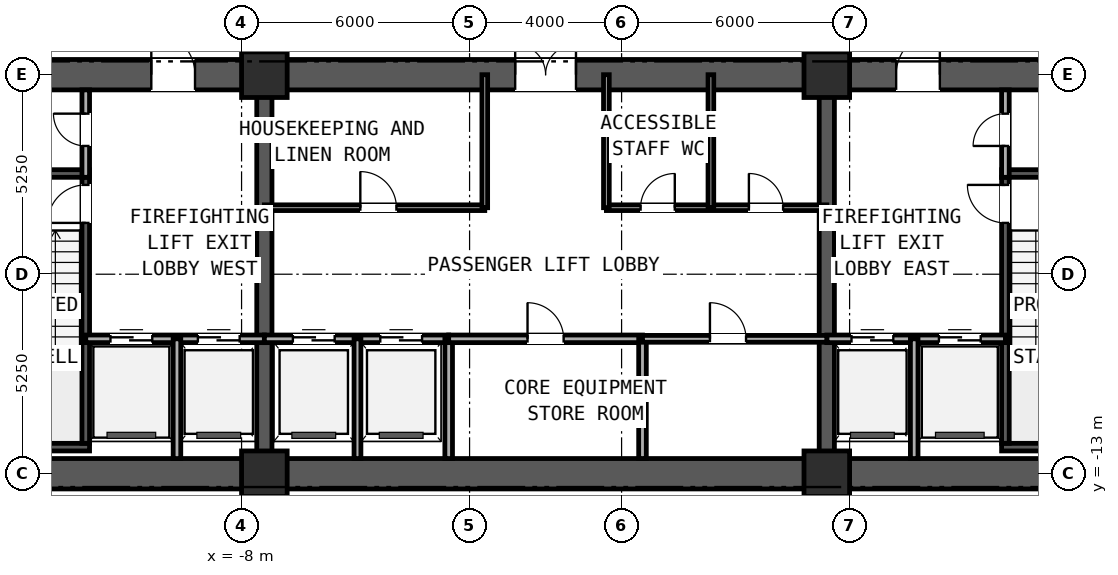
"""IFC4 building model, lengths in metres.
Left out: names, types, materials, properties, quantities, classifications, styles, units other than length and angle.
Written with IfcOpenShell. Run it as: python <this file> out.ifc"""

import sys

from ifc_helpers import new_model, si_unit, direction, frame, frame_2d, origin, origin_2d, place, context, subcontext, project, spatial, rectangle, extrude, element, fill, save


model = new_model("IFC4")
c1 = context("Model", 3, precision=1e-05, world=origin(), true_north=direction((0.0, 1.0)))
c2 = subcontext(c1, "Body", "Model", "MODEL_VIEW")
j1 = project(units=[si_unit("LENGTHUNIT", "METRE"), si_unit("PLANEANGLEUNIT", "RADIAN")], contexts=[c1])
p1 = place(None, origin())
s1 = spatial("IfcSite", under=j1, at=p1, CompositionType="ELEMENT")
p2 = place(p1, origin())
s2 = spatial("IfcBuilding", under=s1, at=p2, CompositionType="ELEMENT")
p3 = place(p2, frame((0.0, 0.0, -10.0)))
s3 = spatial("IfcBuildingStorey", under=s2, at=p3, CompositionType="ELEMENT", Elevation=-10.0)
p4 = place(p3, frame((-16.4, -13.0, 0.0), z_axis=(0.0, 0.0, 1.0), x_axis=(1.0, 0.0, 0.0)))
e1 = element("IfcWall", 1, at=p4, inside=s3, PredefinedType="SHEAR", context=c2, shape_type="SweptSolid", body=[
    extrude(rectangle(XDim=32.8, YDim=0.8, at=frame_2d((16.4, 0.0))), origin(), (0.0, 0.0, 1.0), 4.2),
])
p5 = place(p3, frame((-16.4, -2.5, 0.0), z_axis=(0.0, 0.0, 1.0), x_axis=(1.0, 0.0, 0.0)))
e2 = element("IfcWall", 2, at=p5, inside=s3, PredefinedType="SHEAR", context=c2, shape_type="SweptSolid", body=[
    extrude(rectangle(XDim=32.8, YDim=0.8, at=frame_2d((16.4, 0.0))), origin(), (0.0, 0.0, 1.0), 4.2),
])
p6 = place(p5, frame((6.025, 0.0, 0.0)))
e3 = element("IfcOpeningElement", 3, at=p6, cuts=e2, PredefinedType="OPENING", context=c2, shape_type="SweptSolid", body=[
    extrude(rectangle(XDim=1.15, YDim=2.0, at=frame_2d((0.575, 1.0))), frame((0.0, 0.41, 0.0), z_axis=(0.0, -1.0, 0.0), x_axis=(1.0, 0.0, 0.0)), (0.0, 0.0, 1.0), 0.82),
])
p7 = place(p5, frame((15.6, 0.0, 0.0)))
e4 = element("IfcOpeningElement", 4, at=p7, cuts=e2, PredefinedType="OPENING", context=c2, shape_type="SweptSolid", body=[
    extrude(rectangle(XDim=1.6, YDim=2.0, at=frame_2d((0.8, 1.0))), frame((0.0, 0.41, 0.0), z_axis=(0.0, -1.0, 0.0), x_axis=(1.0, 0.0, 0.0)), (0.0, 0.0, 1.0), 0.82),
])
p8 = place(p5, frame((25.625, 0.0, 0.0)))
e5 = element("IfcOpeningElement", 5, at=p8, cuts=e2, PredefinedType="OPENING", context=c2, shape_type="SweptSolid", body=[
    extrude(rectangle(XDim=1.15, YDim=2.0, at=frame_2d((0.575, 1.0))), frame((0.0, 0.41, 0.0), z_axis=(0.0, -1.0, 0.0), x_axis=(1.0, 0.0, 0.0)), (0.0, 0.0, 1.0), 0.82),
])
for number, where, z_axis, x_axis in (
    (6, (-7.4, -12.6, 0.0), (0.0, 0.0, 1.0), (0.0, 1.0, 0.0)),
    (7, (7.4, -12.6, 0.0), (0.0, 0.0, 1.0), (0.0, 1.0, 0.0)),
):
    element("IfcWall", number, at=place(p3, frame(where, z_axis=z_axis, x_axis=x_axis)), inside=s3, PredefinedType="SHEAR", context=c2, shape_type="SweptSolid", body=[
        extrude(rectangle(XDim=9.7, YDim=0.4, at=frame_2d((4.85, 0.0))), origin(), (0.0, 0.0, 1.0), 4.48),
    ])
for number, where, z_axis, x_axis in (
    (8, (-15.6, -12.3, 0.0), (0.0, 0.0, 1.0), (1.0, 0.0, 0.0)),
    (9, (-15.6, -5.1, 0.0), (0.0, 0.0, 1.0), (1.0, 0.0, 0.0)),
):
    element("IfcWall", number, at=place(p3, frame(where, z_axis=z_axis, x_axis=x_axis)), inside=s3, PredefinedType="SOLIDWALL", context=c2, shape_type="SweptSolid", body=[
        extrude(rectangle(XDim=3.6, YDim=0.2, at=frame_2d((1.8, 0.0))), origin(), (0.0, 0.0, 1.0), 4.48),
    ])
p9 = place(p3, frame((-12.1, -12.2, 0.0), z_axis=(0.0, 0.0, 1.0), x_axis=(0.0, 1.0, 0.0)))
e10 = element("IfcWall", 10, at=p9, inside=s3, PredefinedType="SOLIDWALL", context=c2, shape_type="SweptSolid", body=[
    extrude(rectangle(XDim=7.0, YDim=0.2, at=frame_2d((3.5, 0.0))), origin(), (0.0, 0.0, 1.0), 4.48),
])
p10 = place(p9, frame((5.8, 0.0, 0.0)))
e11 = element("IfcOpeningElement", 11, at=p10, cuts=e10, PredefinedType="OPENING", context=c2, shape_type="SweptSolid", body=[
    extrude(rectangle(XDim=1.0, YDim=2.1, at=frame_2d((0.5, 1.05))), frame((0.0, 0.11, 0.0), z_axis=(0.0, -1.0, 0.0), x_axis=(1.0, 0.0, 0.0)), (0.0, 0.0, 1.0), 0.22),
])
for number, where, z_axis, x_axis in (
    (12, (12.0, -12.3, 0.0), (0.0, 0.0, 1.0), (1.0, 0.0, 0.0)),
    (13, (12.0, -5.1, 0.0), (0.0, 0.0, 1.0), (1.0, 0.0, 0.0)),
):
    element("IfcWall", number, at=place(p3, frame(where, z_axis=z_axis, x_axis=x_axis)), inside=s3, PredefinedType="SOLIDWALL", context=c2, shape_type="SweptSolid", body=[
        extrude(rectangle(XDim=3.6, YDim=0.2, at=frame_2d((1.8, 0.0))), origin(), (0.0, 0.0, 1.0), 4.48),
    ])
p11 = place(p3, frame((12.1, -12.2, 0.0), z_axis=(0.0, 0.0, 1.0), x_axis=(0.0, 1.0, 0.0)))
e14 = element("IfcWall", 14, at=p11, inside=s3, PredefinedType="SOLIDWALL", context=c2, shape_type="SweptSolid", body=[
    extrude(rectangle(XDim=7.0, YDim=0.2, at=frame_2d((3.5, 0.0))), origin(), (0.0, 0.0, 1.0), 4.48),
])
p12 = place(p11, frame((5.8, 0.0, 0.0)))
e15 = element("IfcOpeningElement", 15, at=p12, cuts=e14, PredefinedType="OPENING", context=c2, shape_type="SweptSolid", body=[
    extrude(rectangle(XDim=1.0, YDim=2.1, at=frame_2d((0.5, 1.05))), frame((0.0, 0.11, 0.0), z_axis=(0.0, -1.0, 0.0), x_axis=(1.0, 0.0, 0.0)), (0.0, 0.0, 1.0), 0.22),
])
for number, where, z_axis, x_axis in (
    (16, (-7.4, -13.0, 0.0), (0.0, 0.0, 1.0), (1.0, 0.0, 0.0)),
    (17, (7.4, -13.0, 0.0), (0.0, 0.0, 1.0), (1.0, 0.0, 0.0)),
    (18, (-7.4, -2.5, 0.0), (0.0, 0.0, 1.0), (1.0, 0.0, 0.0)),
    (19, (7.4, -2.5, 0.0), (0.0, 0.0, 1.0), (1.0, 0.0, 0.0)),
):
    element("IfcColumn", number, at=place(p3, frame(where, z_axis=z_axis, x_axis=x_axis)), inside=s3, PredefinedType="COLUMN", context=c2, shape_type="SweptSolid", body=[
        extrude(rectangle(XDim=1.2, YDim=1.2, at=origin_2d()), origin(), (0.0, 0.0, 1.0), 4.8),
    ])
p13 = place(p3, frame((-12.1, -5.2, 0.0), z_axis=(0.0, 0.0, 1.0), x_axis=(0.0, 1.0, 0.0)))
e20 = element("IfcWall", 20, at=p13, inside=s3, PredefinedType="PARTITIONING", context=c2, shape_type="SweptSolid", body=[
    extrude(rectangle(XDim=2.3, YDim=0.2, at=frame_2d((1.15, 0.0))), origin(), (0.0, 0.0, 1.0), 4.48),
])
p14 = place(p13, frame((0.825, 0.0, 0.0)))
e21 = element("IfcOpeningElement", 21, at=p14, cuts=e20, PredefinedType="OPENING", context=c2, shape_type="SweptSolid", body=[
    extrude(rectangle(XDim=0.85, YDim=2.05, at=frame_2d((0.425, 1.025))), frame((0.0, 0.11, 0.0), z_axis=(0.0, -1.0, 0.0), x_axis=(1.0, 0.0, 0.0)), (0.0, 0.0, 1.0), 0.22),
])
p15 = place(p3, frame((12.1, -5.2, 0.0), z_axis=(0.0, 0.0, 1.0), x_axis=(0.0, 1.0, 0.0)))
e22 = element("IfcWall", 22, at=p15, inside=s3, PredefinedType="PARTITIONING", context=c2, shape_type="SweptSolid", body=[
    extrude(rectangle(XDim=2.3, YDim=0.2, at=frame_2d((1.15, 0.0))), origin(), (0.0, 0.0, 1.0), 4.48),
])
p16 = place(p15, frame((0.825, 0.0, 0.0)))
e23 = element("IfcOpeningElement", 23, at=p16, cuts=e22, PredefinedType="OPENING", context=c2, shape_type="SweptSolid", body=[
    extrude(rectangle(XDim=0.85, YDim=2.05, at=frame_2d((0.425, 1.025))), frame((0.0, 0.11, 0.0), z_axis=(0.0, -1.0, 0.0), x_axis=(1.0, 0.0, 0.0)), (0.0, 0.0, 1.0), 0.22),
])
p17 = place(p3, frame((-12.1, -9.45, 0.0), z_axis=(0.0, 0.0, 1.0), x_axis=(1.0, 0.0, 0.0)))
e24 = element("IfcWall", 24, at=p17, inside=s3, PredefinedType="PARTITIONING", context=c2, shape_type="SweptSolid", body=[
    extrude(rectangle(XDim=4.7, YDim=0.2, at=frame_2d((2.35, 0.0))), origin(), (0.0, 0.0, 1.0), 4.48),
])
p18 = place(p17, frame((0.65, 0.0, 0.0)))
e25 = element("IfcOpeningElement", 25, at=p18, cuts=e24, PredefinedType="OPENING", context=c2, shape_type="SweptSolid", body=[
    extrude(rectangle(XDim=1.1, YDim=2.2, at=frame_2d((0.55, 1.1))), frame((0.0, 0.11, 0.0), z_axis=(0.0, -1.0, 0.0), x_axis=(1.0, 0.0, 0.0)), (0.0, 0.0, 1.0), 0.22),
])
p19 = place(p17, frame((2.95, 0.0, 0.0)))
e26 = element("IfcOpeningElement", 26, at=p19, cuts=e24, PredefinedType="OPENING", context=c2, shape_type="SweptSolid", body=[
    extrude(rectangle(XDim=1.1, YDim=2.2, at=frame_2d((0.55, 1.1))), frame((0.0, 0.11, 0.0), z_axis=(0.0, -1.0, 0.0), x_axis=(1.0, 0.0, 0.0)), (0.0, 0.0, 1.0), 0.22),
])
p20 = place(p3, frame((-9.7, -12.6, 0.0), z_axis=(0.0, 0.0, 1.0), x_axis=(0.0, 1.0, 0.0)))
e27 = element("IfcWall", 27, at=p20, inside=s3, PredefinedType="PARTITIONING", context=c2, shape_type="SweptSolid", body=[
    extrude(rectangle(XDim=3.15, YDim=0.2, at=frame_2d((1.575, 0.0))), origin(), (0.0, 0.0, 1.0), 4.48),
])
p21 = place(p3, frame((7.4, -9.45, 0.0), z_axis=(0.0, 0.0, 1.0), x_axis=(1.0, 0.0, 0.0)))
e28 = element("IfcWall", 28, at=p21, inside=s3, PredefinedType="PARTITIONING", context=c2, shape_type="SweptSolid", body=[
    extrude(rectangle(XDim=4.7, YDim=0.2, at=frame_2d((2.35, 0.0))), origin(), (0.0, 0.0, 1.0), 4.48),
])
p22 = place(p21, frame((2.95, 0.0, 0.0)))
e29 = element("IfcOpeningElement", 29, at=p22, cuts=e28, PredefinedType="OPENING", context=c2, shape_type="SweptSolid", body=[
    extrude(rectangle(XDim=1.1, YDim=2.2, at=frame_2d((0.55, 1.1))), frame((0.0, 0.11, 0.0), z_axis=(0.0, -1.0, 0.0), x_axis=(1.0, 0.0, 0.0)), (0.0, 0.0, 1.0), 0.22),
])
p23 = place(p21, frame((0.65, 0.0, 0.0)))
e30 = element("IfcOpeningElement", 30, at=p23, cuts=e28, PredefinedType="OPENING", context=c2, shape_type="SweptSolid", body=[
    extrude(rectangle(XDim=1.1, YDim=2.2, at=frame_2d((0.55, 1.1))), frame((0.0, 0.11, 0.0), z_axis=(0.0, -1.0, 0.0), x_axis=(1.0, 0.0, 0.0)), (0.0, 0.0, 1.0), 0.22),
])
p24 = place(p3, frame((9.7, -12.6, 0.0), z_axis=(0.0, 0.0, 1.0), x_axis=(0.0, 1.0, 0.0)))
e31 = element("IfcWall", 31, at=p24, inside=s3, PredefinedType="PARTITIONING", context=c2, shape_type="SweptSolid", body=[
    extrude(rectangle(XDim=3.15, YDim=0.2, at=frame_2d((1.575, 0.0))), origin(), (0.0, 0.0, 1.0), 4.48),
])
p25 = place(p3, frame((-7.4, -9.45, 0.0), z_axis=(0.0, 0.0, 1.0), x_axis=(1.0, 0.0, 0.0)))
e32 = element("IfcWall", 32, at=p25, inside=s3, PredefinedType="PARTITIONING", context=c2, shape_type="SweptSolid", body=[
    extrude(rectangle(XDim=4.85, YDim=0.2, at=frame_2d((2.425, 0.0))), origin(), (0.0, 0.0, 1.0), 4.48),
])
p26 = place(p25, frame((0.75, 0.0, 0.0)))
e33 = element("IfcOpeningElement", 33, at=p26, cuts=e32, PredefinedType="OPENING", context=c2, shape_type="SweptSolid", body=[
    extrude(rectangle(XDim=1.1, YDim=2.2, at=frame_2d((0.55, 1.1))), frame((0.0, 0.11, 0.0), z_axis=(0.0, -1.0, 0.0), x_axis=(1.0, 0.0, 0.0)), (0.0, 0.0, 1.0), 0.22),
])
p27 = place(p25, frame((3.05, 0.0, 0.0)))
e34 = element("IfcOpeningElement", 34, at=p27, cuts=e32, PredefinedType="OPENING", context=c2, shape_type="SweptSolid", body=[
    extrude(rectangle(XDim=1.1, YDim=2.2, at=frame_2d((0.55, 1.1))), frame((0.0, 0.11, 0.0), z_axis=(0.0, -1.0, 0.0), x_axis=(1.0, 0.0, 0.0)), (0.0, 0.0, 1.0), 0.22),
])
p28 = place(p3, frame((-4.95, -12.6, 0.0), z_axis=(0.0, 0.0, 1.0), x_axis=(0.0, 1.0, 0.0)))
e35 = element("IfcWall", 35, at=p28, inside=s3, PredefinedType="PARTITIONING", context=c2, shape_type="SweptSolid", body=[
    extrude(rectangle(XDim=3.15, YDim=0.18, at=frame_2d((1.575, 0.0))), origin(), (0.0, 0.0, 1.0), 4.48),
])
p29 = place(p3, frame((-2.55, -12.6, 0.0), z_axis=(0.0, 0.0, 1.0), x_axis=(0.0, 1.0, 0.0)))
e36 = element("IfcWall", 36, at=p29, inside=s3, PredefinedType="PARTITIONING", context=c2, shape_type="SweptSolid", body=[
    extrude(rectangle(XDim=3.15, YDim=0.2, at=frame_2d((1.575, 0.0))), origin(), (0.0, 0.0, 1.0), 4.48),
])
p30 = place(p3, frame((-2.55, -9.45, 0.0), z_axis=(0.0, 0.0, 1.0), x_axis=(1.0, 0.0, 0.0)))
e37 = element("IfcWall", 37, at=p30, inside=s3, PredefinedType="PARTITIONING", context=c2, shape_type="SweptSolid", body=[
    extrude(rectangle(XDim=5.1, YDim=0.2, at=frame_2d((2.55, 0.0))), origin(), (0.0, 0.0, 1.0), 4.48),
])
p31 = place(p30, frame((2.075, 0.0, 0.0)))
e38 = element("IfcOpeningElement", 38, at=p31, cuts=e37, PredefinedType="OPENING", context=c2, shape_type="SweptSolid", body=[
    extrude(rectangle(XDim=0.95, YDim=2.15, at=frame_2d((0.475, 1.075))), frame((0.0, 0.11, 0.0), z_axis=(0.0, -1.0, 0.0), x_axis=(1.0, 0.0, 0.0)), (0.0, 0.0, 1.0), 0.22),
])
p32 = place(p3, frame((2.55, -12.6, 0.0), z_axis=(0.0, 0.0, 1.0), x_axis=(0.0, 1.0, 0.0)))
e39 = element("IfcWall", 39, at=p32, inside=s3, PredefinedType="PARTITIONING", context=c2, shape_type="SweptSolid", body=[
    extrude(rectangle(XDim=3.15, YDim=0.2, at=frame_2d((1.575, 0.0))), origin(), (0.0, 0.0, 1.0), 4.48),
])
p33 = place(p3, frame((2.55, -9.45, 0.0), z_axis=(0.0, 0.0, 1.0), x_axis=(1.0, 0.0, 0.0)))
e40 = element("IfcWall", 40, at=p33, inside=s3, PredefinedType="PARTITIONING", context=c2, shape_type="SweptSolid", body=[
    extrude(rectangle(XDim=4.85, YDim=0.18, at=frame_2d((2.425, 0.0))), origin(), (0.0, 0.0, 1.0), 4.48),
])
p34 = place(p33, frame((1.775, 0.0, 0.0)))
e41 = element("IfcOpeningElement", 41, at=p34, cuts=e40, PredefinedType="OPENING", context=c2, shape_type="SweptSolid", body=[
    extrude(rectangle(XDim=0.95, YDim=2.15, at=frame_2d((0.475, 1.075))), frame((0.0, 0.1, 0.0), z_axis=(0.0, -1.0, 0.0), x_axis=(1.0, 0.0, 0.0)), (0.0, 0.0, 1.0), 0.2),
])
p35 = place(p3, frame((-7.4, -6.0, 0.0), z_axis=(0.0, 0.0, 1.0), x_axis=(1.0, 0.0, 0.0)))
e42 = element("IfcWall", 42, at=p35, inside=s3, PredefinedType="PARTITIONING", context=c2, shape_type="SweptSolid", body=[
    extrude(rectangle(XDim=5.8, YDim=0.15, at=frame_2d((2.9, 0.0))), origin(), (0.0, 0.0, 1.0), 4.48),
])
p36 = place(p35, frame((2.525, 0.0, 0.0)))
e43 = element("IfcOpeningElement", 43, at=p36, cuts=e42, PredefinedType="OPENING", context=c2, shape_type="SweptSolid", body=[
    extrude(rectangle(XDim=0.95, YDim=2.15, at=frame_2d((0.475, 1.075))), frame((0.0, 0.085, 0.0), z_axis=(0.0, -1.0, 0.0), x_axis=(1.0, 0.0, 0.0)), (0.0, 0.0, 1.0), 0.17),
])
p37 = place(p3, frame((-1.6, -6.0, 0.0), z_axis=(0.0, 0.0, 1.0), x_axis=(0.0, 1.0, 0.0)))
e44 = element("IfcWall", 44, at=p37, inside=s3, PredefinedType="PARTITIONING", context=c2, shape_type="SweptSolid", body=[
    extrude(rectangle(XDim=3.5, YDim=0.15, at=frame_2d((1.75, 0.0))), origin(), (0.0, 0.0, 1.0), 3.61),
])
p38 = place(p3, frame((1.6, -6.0, 0.0), z_axis=(0.0, 0.0, 1.0), x_axis=(1.0, 0.0, 0.0)))
e45 = element("IfcWall", 45, at=p38, inside=s3, PredefinedType="PARTITIONING", context=c2, shape_type="SweptSolid", body=[
    extrude(rectangle(XDim=5.8, YDim=0.15, at=frame_2d((2.9, 0.0))), origin(), (0.0, 0.0, 1.0), 4.48),
])
p39 = place(p38, frame((0.9, 0.0, 0.0)))
e46 = element("IfcOpeningElement", 46, at=p39, cuts=e45, PredefinedType="OPENING", context=c2, shape_type="SweptSolid", body=[
    extrude(rectangle(XDim=0.9, YDim=2.1, at=frame_2d((0.45, 1.05))), frame((0.0, 0.085, 0.0), z_axis=(0.0, -1.0, 0.0), x_axis=(1.0, 0.0, 0.0)), (0.0, 0.0, 1.0), 0.17),
])
p40 = place(p38, frame((3.75, 0.0, 0.0)))
e47 = element("IfcOpeningElement", 47, at=p40, cuts=e45, PredefinedType="OPENING", context=c2, shape_type="SweptSolid", body=[
    extrude(rectangle(XDim=0.9, YDim=2.1, at=frame_2d((0.45, 1.05))), frame((0.0, 0.085, 0.0), z_axis=(0.0, -1.0, 0.0), x_axis=(1.0, 0.0, 0.0)), (0.0, 0.0, 1.0), 0.17),
])
for number, where, z_axis, x_axis in (
    (48, (1.6, -6.0, 0.0), (0.0, 0.0, 1.0), (0.0, 1.0, 0.0)),
    (49, (4.35, -6.0, 0.0), (0.0, 0.0, 1.0), (0.0, 1.0, 0.0)),
):
    element("IfcWall", number, at=place(p3, frame(where, z_axis=z_axis, x_axis=x_axis)), inside=s3, PredefinedType="PARTITIONING", context=c2, shape_type="SweptSolid", body=[
        extrude(rectangle(XDim=3.5, YDim=0.15, at=frame_2d((1.75, 0.0))), origin(), (0.0, 0.0, 1.0), 3.61),
    ])
p41 = place(p10, frame((1.0, 0.0, 0.0), z_axis=(0.0, 0.0, 1.0), x_axis=(-1.0, 0.0, 0.0)))
e50 = element("IfcDoor", 50, at=p41, inside=s3, OperationType="SINGLE_SWING_LEFT", PredefinedType="DOOR", context=c2, shape_type="SweptSolid", body=[
    extrude(rectangle(XDim=1.0, YDim=2.1, at=frame_2d((0.5, 1.05))), frame((0.0, 0.025, 0.0), z_axis=(0.0, -1.0, 0.0), x_axis=(1.0, 0.0, 0.0)), (0.0, 0.0, 1.0), 0.05),
])
fill(e11, e50)
p42 = place(p14, origin())
e51 = element("IfcDoor", 51, at=p42, inside=s3, OperationType="SINGLE_SWING_RIGHT", PredefinedType="DOOR", context=c2, shape_type="SweptSolid", body=[
    extrude(rectangle(XDim=0.85, YDim=2.05, at=frame_2d((0.425, 1.025))), frame((0.0, 0.025, 0.0), z_axis=(0.0, -1.0, 0.0), x_axis=(1.0, 0.0, 0.0)), (0.0, 0.0, 1.0), 0.05),
])
fill(e21, e51)
p43 = place(p12, origin())
e52 = element("IfcDoor", 52, at=p43, inside=s3, OperationType="SINGLE_SWING_RIGHT", PredefinedType="DOOR", context=c2, shape_type="SweptSolid", body=[
    extrude(rectangle(XDim=1.0, YDim=2.1, at=frame_2d((0.5, 1.05))), frame((0.0, 0.025, 0.0), z_axis=(0.0, -1.0, 0.0), x_axis=(1.0, 0.0, 0.0)), (0.0, 0.0, 1.0), 0.05),
])
fill(e15, e52)
p44 = place(p16, frame((0.85, 0.0, 0.0), z_axis=(0.0, 0.0, 1.0), x_axis=(-1.0, 0.0, 0.0)))
e53 = element("IfcDoor", 53, at=p44, inside=s3, OperationType="SINGLE_SWING_LEFT", PredefinedType="DOOR", context=c2, shape_type="SweptSolid", body=[
    extrude(rectangle(XDim=0.85, YDim=2.05, at=frame_2d((0.425, 1.025))), frame((0.0, 0.025, 0.0), z_axis=(0.0, -1.0, 0.0), x_axis=(1.0, 0.0, 0.0)), (0.0, 0.0, 1.0), 0.05),
])
fill(e23, e53)
p45 = place(p18, origin())
e54 = element("IfcDoor", 54, at=p45, inside=s3, OperationType="SLIDING_TO_LEFT", PredefinedType="DOOR", context=c2, shape_type="SweptSolid", body=[
    extrude(rectangle(XDim=1.1, YDim=2.2, at=frame_2d((0.55, 1.1))), frame((0.0, 0.025, 0.0), z_axis=(0.0, -1.0, 0.0), x_axis=(1.0, 0.0, 0.0)), (0.0, 0.0, 1.0), 0.05),
])
fill(e25, e54)
p46 = place(p19, origin())
e55 = element("IfcDoor", 55, at=p46, inside=s3, OperationType="SLIDING_TO_RIGHT", PredefinedType="DOOR", context=c2, shape_type="SweptSolid", body=[
    extrude(rectangle(XDim=1.1, YDim=2.2, at=frame_2d((0.55, 1.1))), frame((0.0, 0.025, 0.0), z_axis=(0.0, -1.0, 0.0), x_axis=(1.0, 0.0, 0.0)), (0.0, 0.0, 1.0), 0.05),
])
fill(e26, e55)
p47 = place(p22, origin())
e56 = element("IfcDoor", 56, at=p47, inside=s3, OperationType="SLIDING_TO_LEFT", PredefinedType="DOOR", context=c2, shape_type="SweptSolid", body=[
    extrude(rectangle(XDim=1.1, YDim=2.2, at=frame_2d((0.55, 1.1))), frame((0.0, 0.025, 0.0), z_axis=(0.0, -1.0, 0.0), x_axis=(1.0, 0.0, 0.0)), (0.0, 0.0, 1.0), 0.05),
])
fill(e29, e56)
p48 = place(p23, origin())
e57 = element("IfcDoor", 57, at=p48, inside=s3, OperationType="SLIDING_TO_RIGHT", PredefinedType="DOOR", context=c2, shape_type="SweptSolid", body=[
    extrude(rectangle(XDim=1.1, YDim=2.2, at=frame_2d((0.55, 1.1))), frame((0.0, 0.025, 0.0), z_axis=(0.0, -1.0, 0.0), x_axis=(1.0, 0.0, 0.0)), (0.0, 0.0, 1.0), 0.05),
])
fill(e30, e57)
p49 = place(p6, origin())
e58 = element("IfcDoor", 58, at=p49, inside=s3, OperationType="SINGLE_SWING_LEFT", PredefinedType="DOOR", context=c2, shape_type="SweptSolid", body=[
    extrude(rectangle(XDim=1.15, YDim=2.0, at=frame_2d((0.575, 1.0))), frame((0.0, 0.025, 0.0), z_axis=(0.0, -1.0, 0.0), x_axis=(1.0, 0.0, 0.0)), (0.0, 0.0, 1.0), 0.05),
])
fill(e3, e58)
p50 = place(p7, origin())
e59 = element("IfcDoor", 59, at=p50, inside=s3, OperationType="DOUBLE_DOOR_SINGLE_SWING", PredefinedType="DOOR", context=c2, shape_type="SweptSolid", body=[
    extrude(rectangle(XDim=1.6, YDim=2.0, at=frame_2d((0.8, 1.0))), frame((0.0, 0.025, 0.0), z_axis=(0.0, -1.0, 0.0), x_axis=(1.0, 0.0, 0.0)), (0.0, 0.0, 1.0), 0.05),
])
fill(e4, e59)
p51 = place(p8, origin())
e60 = element("IfcDoor", 60, at=p51, inside=s3, OperationType="SINGLE_SWING_RIGHT", PredefinedType="DOOR", context=c2, shape_type="SweptSolid", body=[
    extrude(rectangle(XDim=1.15, YDim=2.0, at=frame_2d((0.575, 1.0))), frame((0.0, 0.025, 0.0), z_axis=(0.0, -1.0, 0.0), x_axis=(1.0, 0.0, 0.0)), (0.0, 0.0, 1.0), 0.05),
])
fill(e5, e60)
p52 = place(p26, origin())
e61 = element("IfcDoor", 61, at=p52, inside=s3, OperationType="SLIDING_TO_LEFT", PredefinedType="DOOR", context=c2, shape_type="SweptSolid", body=[
    extrude(rectangle(XDim=1.1, YDim=2.2, at=frame_2d((0.55, 1.1))), frame((0.0, 0.025, 0.0), z_axis=(0.0, -1.0, 0.0), x_axis=(1.0, 0.0, 0.0)), (0.0, 0.0, 1.0), 0.05),
])
fill(e33, e61)
p53 = place(p27, origin())
e62 = element("IfcDoor", 62, at=p53, inside=s3, OperationType="SLIDING_TO_LEFT", PredefinedType="DOOR", context=c2, shape_type="SweptSolid", body=[
    extrude(rectangle(XDim=1.1, YDim=2.2, at=frame_2d((0.55, 1.1))), frame((0.0, 0.025, 0.0), z_axis=(0.0, -1.0, 0.0), x_axis=(1.0, 0.0, 0.0)), (0.0, 0.0, 1.0), 0.05),
])
fill(e34, e62)
p54 = place(p31, origin())
e63 = element("IfcDoor", 63, at=p54, inside=s3, OperationType="SINGLE_SWING_LEFT", PredefinedType="DOOR", context=c2, shape_type="SweptSolid", body=[
    extrude(rectangle(XDim=0.95, YDim=2.15, at=frame_2d((0.475, 1.075))), frame((0.0, 0.025, 0.0), z_axis=(0.0, -1.0, 0.0), x_axis=(1.0, 0.0, 0.0)), (0.0, 0.0, 1.0), 0.05),
])
fill(e38, e63)
p55 = place(p34, origin())
e64 = element("IfcDoor", 64, at=p55, inside=s3, OperationType="SINGLE_SWING_LEFT", PredefinedType="DOOR", context=c2, shape_type="SweptSolid", body=[
    extrude(rectangle(XDim=0.95, YDim=2.15, at=frame_2d((0.475, 1.075))), frame((0.0, 0.025, 0.0), z_axis=(0.0, -1.0, 0.0), x_axis=(1.0, 0.0, 0.0)), (0.0, 0.0, 1.0), 0.05),
])
fill(e41, e64)
p56 = place(p36, frame((0.95, 0.0, 0.0), z_axis=(0.0, 0.0, 1.0), x_axis=(-1.0, 0.0, 0.0)))
e65 = element("IfcDoor", 65, at=p56, inside=s3, OperationType="SINGLE_SWING_LEFT", PredefinedType="DOOR", context=c2, shape_type="SweptSolid", body=[
    extrude(rectangle(XDim=0.95, YDim=2.15, at=frame_2d((0.475, 1.075))), frame((0.0, 0.025, 0.0), z_axis=(0.0, -1.0, 0.0), x_axis=(1.0, 0.0, 0.0)), (0.0, 0.0, 1.0), 0.05),
])
fill(e43, e65)
p57 = place(p39, frame((0.9, 0.0, 0.0), z_axis=(0.0, 0.0, 1.0), x_axis=(-1.0, 0.0, 0.0)))
e66 = element("IfcDoor", 66, at=p57, inside=s3, OperationType="SINGLE_SWING_RIGHT", PredefinedType="DOOR", context=c2, shape_type="SweptSolid", body=[
    extrude(rectangle(XDim=0.9, YDim=2.1, at=frame_2d((0.45, 1.05))), frame((0.0, 0.025, 0.0), z_axis=(0.0, -1.0, 0.0), x_axis=(1.0, 0.0, 0.0)), (0.0, 0.0, 1.0), 0.05),
])
fill(e46, e66)
p58 = place(p40, frame((0.9, 0.0, 0.0), z_axis=(0.0, 0.0, 1.0), x_axis=(-1.0, 0.0, 0.0)))
e67 = element("IfcDoor", 67, at=p58, inside=s3, OperationType="SINGLE_SWING_LEFT", PredefinedType="DOOR", context=c2, shape_type="SweptSolid", body=[
    extrude(rectangle(XDim=0.9, YDim=2.1, at=frame_2d((0.45, 1.05))), frame((0.0, 0.025, 0.0), z_axis=(0.0, -1.0, 0.0), x_axis=(1.0, 0.0, 0.0)), (0.0, 0.0, 1.0), 0.05),
])
fill(e47, e67)
save(model, sys.argv[1])
